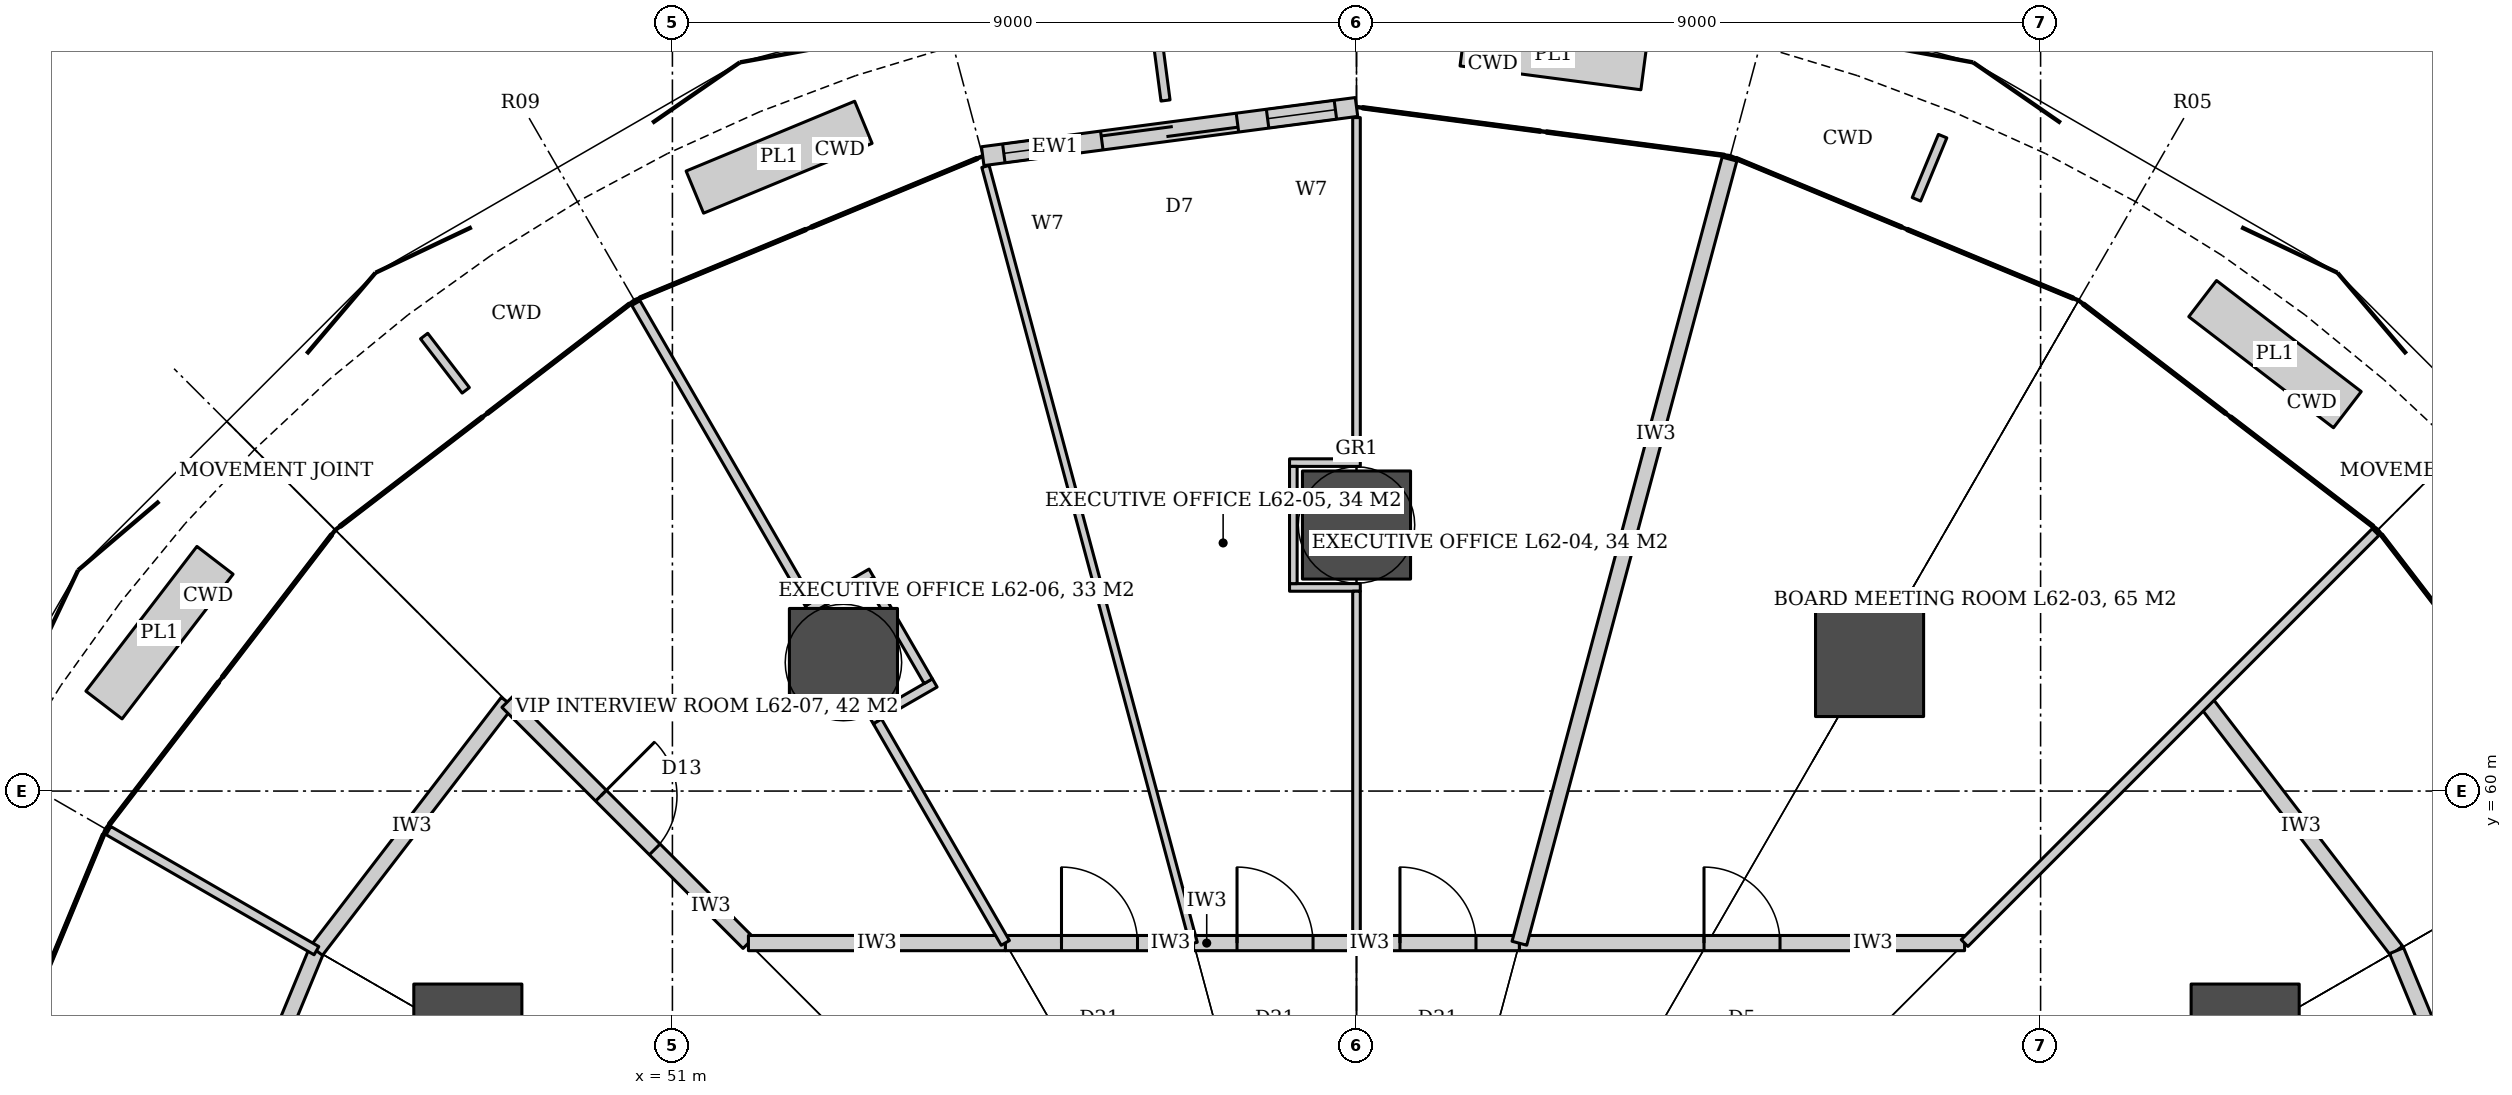
"""IFC4 building model, lengths in metres.
Left out: names, types, materials, properties, quantities, classifications, styles, units other than length and angle.
Written with IfcOpenShell. Run it as: python <this file> out.ifc"""

import sys

from ifc_helpers import new_model, si_unit, direction, frame, frame_2d, origin, origin_2d, place, context, subcontext, project, spatial, rectangle, hollow_circle, extrude, element, fill, save


model = new_model("IFC4")
c1 = context("Model", 3, precision=1e-05, world=origin(), true_north=direction((0.0, 1.0)))
c2 = subcontext(c1, "Body", "Model", "MODEL_VIEW")
j1 = project(units=[si_unit("LENGTHUNIT", "METRE"), si_unit("PLANEANGLEUNIT", "RADIAN")], contexts=[c1])
p1 = place(None, origin())
s1 = spatial("IfcSite", under=j1, at=p1, CompositionType="ELEMENT")
p2 = place(p1, origin())
s2 = spatial("IfcBuilding", under=s1, at=p2, CompositionType="ELEMENT")
p3 = place(p2, frame((0.0, 0.0, 269.6)))
s3 = spatial("IfcBuildingStorey", under=s2, at=p3, CompositionType="ELEMENT", Elevation=269.6)
for number, where, z_axis, x_axis in (
    (1, (71.691, 56.75, 0.0), (0.0, 0.0, 1.0), (1.0, 0.0, 0.0)),
    (2, (66.75, 61.691, 0.0), (0.0, 0.0, 1.0), (1.0, 0.0, 0.0)),
    (3, (60.0, 63.5, 0.0), (0.0, 0.0, 1.0), (1.0, 0.0, 0.0)),
    (4, (53.25, 61.691, 0.0), (0.0, 0.0, 1.0), (1.0, 0.0, 0.0)),
    (5, (48.309, 56.75, 0.0), (0.0, 0.0, 1.0), (1.0, 0.0, 0.0)),
):
    element("IfcColumn", number, at=place(p3, frame(where, z_axis=z_axis, x_axis=x_axis)), inside=s3, PredefinedType="COLUMN", context=c2, shape_type="SweptSolid", body=[
        extrude(hollow_circle(Radius=0.711, WallThickness=0.07, at=origin_2d()), origin(), (0.0, 0.0, 1.0), 4.2),
    ])
p4 = place(p3, frame((44.738, 54.089, 0.0), z_axis=(0.0, 0.0, 1.0), x_axis=(0.382731667114, 0.923859551549, 0.0)))
e6 = element("IfcWall", 6, at=p4, inside=s3, PredefinedType="PARTITIONING", context=c2, shape_type="SweptSolid", body=[
    extrude(rectangle(XDim=4.125, YDim=0.2, at=frame_2d((2.062, 0.0))), origin(), (0.0, 0.0, 1.0), 3.02),
])
p5 = place(p3, frame((46.317, 57.9, 0.0), z_axis=(0.0, 0.0, 1.0), x_axis=(0.608714823874, 0.793389099494, 0.0)))
e7 = element("IfcWall", 7, at=p5, inside=s3, PredefinedType="PARTITIONING", context=c2, shape_type="SweptSolid", body=[
    extrude(rectangle(XDim=4.125, YDim=0.2, at=frame_2d((2.062, 0.0))), origin(), (0.0, 0.0, 1.0), 3.02),
])
p6 = place(p3, frame((48.828, 61.172, 0.0), z_axis=(0.0, 0.0, 1.0), x_axis=(0.707106781187, -0.707106781187, 0.0)))
e8 = element("IfcWall", 8, at=p6, inside=s3, PredefinedType="PARTITIONING", context=c2, shape_type="SweptSolid", body=[
    extrude(rectangle(XDim=4.486, YDim=0.2, at=frame_2d((2.243, 0.0))), origin(), (0.0, 0.0, 1.0), 3.02),
])
p7 = place(p6, frame((1.743, 0.0, 0.0)))
e9 = element("IfcOpeningElement", 9, at=p7, cuts=e8, PredefinedType="OPENING", context=c2, shape_type="SweptSolid", body=[
    extrude(rectangle(XDim=1.0, YDim=2.4, at=frame_2d((0.5, 1.2))), frame((0.0, 0.11, 0.0), z_axis=(0.0, -1.0, 0.0), x_axis=(1.0, 0.0, 0.0)), (0.0, 0.0, 1.0), 0.22),
])
p8 = place(p3, frame((52.0, 58.0, 0.0), z_axis=(0.0, 0.0, 1.0), x_axis=(1.0, 0.0, 0.0)))
e10 = element("IfcWall", 10, at=p8, inside=s3, PredefinedType="PARTITIONING", context=c2, shape_type="SweptSolid", body=[
    extrude(rectangle(XDim=3.381, YDim=0.2, at=frame_2d((1.69, 0.0))), origin(), (0.0, 0.0, 1.0), 3.04),
])
p9 = place(p3, frame((55.381, 58.0, 0.0), z_axis=(0.0, 0.0, 1.0), x_axis=(1.0, 0.0, 0.0)))
e11 = element("IfcWall", 11, at=p9, inside=s3, PredefinedType="PARTITIONING", context=c2, shape_type="SweptSolid", body=[
    extrude(rectangle(XDim=2.475, YDim=0.2, at=frame_2d((1.238, 0.0))), origin(), (0.0, 0.0, 1.0), 3.04),
])
p10 = place(p9, frame((0.738, 0.0, 0.0)))
e12 = element("IfcOpeningElement", 12, at=p10, cuts=e11, PredefinedType="OPENING", context=c2, shape_type="SweptSolid", body=[
    extrude(rectangle(XDim=1.0, YDim=2.7, at=frame_2d((0.5, 1.35))), frame((0.0, 0.11, 0.0), z_axis=(0.0, -1.0, 0.0), x_axis=(1.0, 0.0, 0.0)), (0.0, 0.0, 1.0), 0.22),
])
p11 = place(p3, frame((57.856, 58.0, 0.0), z_axis=(0.0, 0.0, 1.0), x_axis=(1.0, 0.0, 0.0)))
e13 = element("IfcWall", 13, at=p11, inside=s3, PredefinedType="PARTITIONING", context=c2, shape_type="SweptSolid", body=[
    extrude(rectangle(XDim=2.144, YDim=0.2, at=frame_2d((1.072, 0.0))), origin(), (0.0, 0.0, 1.0), 3.04),
])
p12 = place(p11, frame((0.572, 0.0, 0.0)))
e14 = element("IfcOpeningElement", 14, at=p12, cuts=e13, PredefinedType="OPENING", context=c2, shape_type="SweptSolid", body=[
    extrude(rectangle(XDim=1.0, YDim=2.7, at=frame_2d((0.5, 1.35))), frame((0.0, 0.11, 0.0), z_axis=(0.0, -1.0, 0.0), x_axis=(1.0, 0.0, 0.0)), (0.0, 0.0, 1.0), 0.22),
])
p13 = place(p3, frame((60.0, 58.0, 0.0), z_axis=(0.0, 0.0, 1.0), x_axis=(1.0, 0.0, 0.0)))
e15 = element("IfcWall", 15, at=p13, inside=s3, PredefinedType="PARTITIONING", context=c2, shape_type="SweptSolid", body=[
    extrude(rectangle(XDim=2.144, YDim=0.2, at=frame_2d((1.072, 0.0))), origin(), (0.0, 0.0, 1.0), 3.04),
])
p14 = place(p13, frame((0.572, 0.0, 0.0)))
e16 = element("IfcOpeningElement", 16, at=p14, cuts=e15, PredefinedType="OPENING", context=c2, shape_type="SweptSolid", body=[
    extrude(rectangle(XDim=1.0, YDim=2.7, at=frame_2d((0.5, 1.35))), frame((0.0, 0.11, 0.0), z_axis=(0.0, -1.0, 0.0), x_axis=(1.0, 0.0, 0.0)), (0.0, 0.0, 1.0), 0.22),
])
p15 = place(p3, frame((62.144, 58.0, 0.0), z_axis=(0.0, 0.0, 1.0), x_axis=(1.0, 0.0, 0.0)))
e17 = element("IfcWall", 17, at=p15, inside=s3, PredefinedType="PARTITIONING", context=c2, shape_type="SweptSolid", body=[
    extrude(rectangle(XDim=5.856, YDim=0.2, at=frame_2d((2.928, 0.0))), origin(), (0.0, 0.0, 1.0), 3.04),
])
p16 = place(p15, frame((2.428, 0.0, 0.0)))
e18 = element("IfcOpeningElement", 18, at=p16, cuts=e17, PredefinedType="OPENING", context=c2, shape_type="SweptSolid", body=[
    extrude(rectangle(XDim=1.0, YDim=2.1, at=frame_2d((0.5, 1.05))), frame((0.0, 0.11, 0.0), z_axis=(0.0, -1.0, 0.0), x_axis=(1.0, 0.0, 0.0)), (0.0, 0.0, 1.0), 0.22),
])
p17 = place(p3, frame((71.172, 61.172, 0.0), z_axis=(0.0, 0.0, 1.0), x_axis=(0.608714823874, -0.793389099494, 0.0)))
e19 = element("IfcWall", 19, at=p17, inside=s3, PredefinedType="PARTITIONING", context=c2, shape_type="SweptSolid", body=[
    extrude(rectangle(XDim=4.125, YDim=0.2, at=frame_2d((2.062, 0.0))), origin(), (0.0, 0.0, 1.0), 3.02),
])
p18 = place(p3, frame((73.683, 57.9, 0.0), z_axis=(0.0, 0.0, 1.0), x_axis=(0.382731667114, -0.923859551549, 0.0)))
e20 = element("IfcWall", 20, at=p18, inside=s3, PredefinedType="PARTITIONING", context=c2, shape_type="SweptSolid", body=[
    extrude(rectangle(XDim=4.125, YDim=0.2, at=frame_2d((2.062, 0.0))), origin(), (0.0, 0.0, 1.0), 3.02),
])
p19 = place(p3, frame((68.0, 58.0, 0.0), z_axis=(0.0, 0.0, 1.0), x_axis=(0.707106781187, 0.707106781187, 0.0)))
e21 = element("IfcWall", 21, at=p19, inside=s3, PredefinedType="PARTITIONING", context=c2, shape_type="SweptSolid", body=[
    extrude(rectangle(XDim=7.646, YDim=0.125, at=frame_2d((3.823, 0.0))), origin(), (0.0, 0.0, 1.0), 3.02),
])
p20 = place(p3, frame((62.143, 57.998, 0.0), z_axis=(0.0, 0.0, 1.0), x_axis=(0.258814926071, 0.965926929971, 0.0)))
e22 = element("IfcWall", 22, at=p20, inside=s3, PredefinedType="PARTITIONING", context=c2, shape_type="SweptSolid", body=[
    extrude(rectangle(XDim=10.68, YDim=0.2, at=frame_2d((5.34, 0.0))), origin(), (0.0, 0.0, 1.0), 3.02),
])
for number, where, z_axis, x_axis in (
    (23, (60.05, 62.679, 0.0), (0.0, 0.0, 1.0), (-1.0, 0.0, 0.0)),
    (24, (60.05, 64.321, 0.0), (0.0, 0.0, 1.0), (-1.0, 0.0, 0.0)),
):
    element("IfcWall", number, at=place(p3, frame(where, z_axis=z_axis, x_axis=x_axis)), inside=s3, PredefinedType="PARTITIONING", context=c2, shape_type="SweptSolid", body=[
        extrude(rectangle(XDim=0.931, YDim=0.1, at=frame_2d((0.466, 0.0))), origin(), (0.0, 0.0, 1.0), 3.02),
    ])
p21 = place(p3, frame((59.169, 62.729, 0.0), z_axis=(0.0, 0.0, 1.0), x_axis=(0.0, 1.0, 0.0)))
e25 = element("IfcWall", 25, at=p21, inside=s3, PredefinedType="PARTITIONING", context=c2, shape_type="SweptSolid", body=[
    extrude(rectangle(XDim=1.542, YDim=0.1, at=frame_2d((0.771, 0.0))), origin(), (0.0, 0.0, 1.0), 3.02),
])
p22 = place(p3, frame((60.0, 58.0, 0.0), z_axis=(0.0, 0.0, 1.0), x_axis=(0.0, 1.0, 0.0)))
e26 = element("IfcWall", 26, at=p22, inside=s3, PredefinedType="PARTITIONING", context=c2, shape_type="SweptSolid", body=[
    extrude(rectangle(XDim=4.629, YDim=0.1, at=frame_2d((2.314, 0.0))), origin(), (0.0, 0.0, 1.0), 3.04),
])
p23 = place(p3, frame((60.0, 64.371, 0.0), z_axis=(0.0, 0.0, 1.0), x_axis=(0.0, 1.0, 0.0)))
e27 = element("IfcWall", 27, at=p23, inside=s3, PredefinedType="PARTITIONING", context=c2, shape_type="SweptSolid", body=[
    extrude(rectangle(XDim=4.489, YDim=0.1, at=frame_2d((2.245, 0.0))), origin(), (0.0, 0.0, 1.0), 3.02),
])
p24 = place(p3, frame((57.857, 57.998, 0.0), z_axis=(0.0, 0.0, 1.0), x_axis=(-0.258817209762, 0.965926318065, 0.0)))
e28 = element("IfcWall", 28, at=p24, inside=s3, PredefinedType="PARTITIONING", context=c2, shape_type="SweptSolid", body=[
    extrude(rectangle(XDim=10.58, YDim=0.1, at=frame_2d((5.29, 0.0))), origin(), (0.0, 0.0, 1.0), 3.02),
])
for number, where, z_axis, x_axis in (
    (29, (53.613, 60.938, 0.0), (0.0, 0.0, 1.0), (0.866, 0.5, 0.0)),
    (30, (52.779, 62.382, 0.0), (0.0, 0.0, 1.0), (0.866, 0.5, 0.0)),
):
    element("IfcWall", number, at=place(p3, frame(where, z_axis=z_axis, x_axis=x_axis)), inside=s3, PredefinedType="PARTITIONING", context=c2, shape_type="SweptSolid", body=[
        extrude(rectangle(XDim=0.969, YDim=0.125, at=frame_2d((0.484, 0.0))), origin(), (0.0, 0.0, 1.0), 3.02),
    ])
p25 = place(p3, frame((54.366, 61.445, 0.0), z_axis=(0.0, 0.0, 1.0), x_axis=(-0.499987416453, 0.866032668777, 0.0)))
e31 = element("IfcWall", 31, at=p25, inside=s3, PredefinedType="PARTITIONING", context=c2, shape_type="SweptSolid", body=[
    extrude(rectangle(XDim=1.542, YDim=0.125, at=frame_2d((0.771, 0.0))), origin(), (0.0, 0.0, 1.0), 3.02),
])
p26 = place(p3, frame((55.38, 58.002, 0.0), z_axis=(0.0, 0.0, 1.0), x_axis=(-0.500003080363, 0.866023625329, 0.0)))
e32 = element("IfcWall", 32, at=p26, inside=s3, PredefinedType="PARTITIONING", context=c2, shape_type="SweptSolid", body=[
    extrude(rectangle(XDim=3.364, YDim=0.125, at=frame_2d((1.682, 0.0))), origin(), (0.0, 0.0, 1.0), 3.04),
])
p27 = place(p3, frame((52.802, 62.467, 0.0), z_axis=(0.0, 0.0, 1.0), x_axis=(-0.499987929865, 0.866032372368, 0.0)))
e33 = element("IfcWall", 33, at=p27, inside=s3, PredefinedType="PARTITIONING", context=c2, shape_type="SweptSolid", body=[
    extrude(rectangle(XDim=4.564, YDim=0.125, at=frame_2d((2.282, 0.0))), origin(), (0.0, 0.0, 1.0), 3.02),
])
p28 = place(p3, frame((46.317, 57.9, 0.0), z_axis=(0.0, 0.0, 1.0), x_axis=(-0.866028632512, 0.499994407638, 0.0)))
e34 = element("IfcWall", 34, at=p28, inside=s3, PredefinedType="PARTITIONING", context=c2, shape_type="SweptSolid", body=[
    extrude(rectangle(XDim=3.16, YDim=0.125, at=frame_2d((1.58, 0.0))), origin(), (0.0, 0.0, 1.0), 3.02),
])
p29 = place(p3, frame((60.0, 69.0, 0.0), z_axis=(0.0, 0.0, 1.0), x_axis=(-0.991443234469, -0.130538549191, 0.0)))
e35 = element("IfcWall", 35, at=p29, inside=s3, PredefinedType="SOLIDWALL", context=c2, shape_type="SweptSolid", body=[
    extrude(rectangle(XDim=4.96, YDim=0.25, at=frame_2d((2.48, 0.0))), origin(), (0.0, 0.0, 1.0), 4.04),
])
p30 = place(p29, frame((1.58, 0.0, 0.0)))
e36 = element("IfcOpeningElement", 36, at=p30, cuts=e35, PredefinedType="OPENING", context=c2, shape_type="SweptSolid", body=[
    extrude(rectangle(XDim=1.8, YDim=2.4, at=frame_2d((0.9, 1.2))), frame((0.0, 0.135, 0.0), z_axis=(0.0, -1.0, 0.0), x_axis=(1.0, 0.0, 0.0)), (0.0, 0.0, 1.0), 0.27),
])
p31 = place(p29, frame((0.28, 0.0, 0.0)))
e37 = element("IfcOpeningElement", 37, at=p31, cuts=e35, PredefinedType="OPENING", context=c2, shape_type="SweptSolid", body=[
    extrude(rectangle(XDim=0.9, YDim=2.4, at=frame_2d((0.45, 1.2))), frame((0.0, 0.135, 0.0), z_axis=(0.0, -1.0, 0.0), x_axis=(1.0, 0.0, 0.0)), (0.0, 0.0, 1.0), 0.27),
])
p32 = place(p29, frame((3.78, 0.0, 0.0)))
e38 = element("IfcOpeningElement", 38, at=p32, cuts=e35, PredefinedType="OPENING", context=c2, shape_type="SweptSolid", body=[
    extrude(rectangle(XDim=0.9, YDim=2.4, at=frame_2d((0.45, 1.2))), frame((0.0, 0.135, 0.0), z_axis=(0.0, -1.0, 0.0), x_axis=(1.0, 0.0, 0.0)), (0.0, 0.0, 1.0), 0.27),
])
p33 = place(p16, origin())
e39 = element("IfcDoor", 39, at=p33, inside=s3, OperationType="SINGLE_SWING_LEFT", PredefinedType="DOOR", context=c2, shape_type="SweptSolid", body=[
    extrude(rectangle(XDim=1.0, YDim=2.1, at=frame_2d((0.5, 1.05))), frame((0.0, 0.025, 0.0), z_axis=(0.0, -1.0, 0.0), x_axis=(1.0, 0.0, 0.0)), (0.0, 0.0, 1.0), 0.05),
])
fill(e18, e39)
p34 = place(p14, origin())
e40 = element("IfcDoor", 40, at=p34, inside=s3, OperationType="SINGLE_SWING_LEFT", PredefinedType="DOOR", context=c2, shape_type="SweptSolid", body=[
    extrude(rectangle(XDim=1.0, YDim=2.7, at=frame_2d((0.5, 1.35))), frame((0.0, 0.025, 0.0), z_axis=(0.0, -1.0, 0.0), x_axis=(1.0, 0.0, 0.0)), (0.0, 0.0, 1.0), 0.05),
])
fill(e16, e40)
p35 = place(p12, origin())
e41 = element("IfcDoor", 41, at=p35, inside=s3, OperationType="SINGLE_SWING_LEFT", PredefinedType="DOOR", context=c2, shape_type="SweptSolid", body=[
    extrude(rectangle(XDim=1.0, YDim=2.7, at=frame_2d((0.5, 1.35))), frame((0.0, 0.025, 0.0), z_axis=(0.0, -1.0, 0.0), x_axis=(1.0, 0.0, 0.0)), (0.0, 0.0, 1.0), 0.05),
])
fill(e14, e41)
p36 = place(p10, origin())
e42 = element("IfcDoor", 42, at=p36, inside=s3, OperationType="SINGLE_SWING_LEFT", PredefinedType="DOOR", context=c2, shape_type="SweptSolid", body=[
    extrude(rectangle(XDim=1.0, YDim=2.7, at=frame_2d((0.5, 1.35))), frame((0.0, 0.025, 0.0), z_axis=(0.0, -1.0, 0.0), x_axis=(1.0, 0.0, 0.0)), (0.0, 0.0, 1.0), 0.05),
])
fill(e12, e42)
p37 = place(p7, origin())
e43 = element("IfcDoor", 43, at=p37, inside=s3, OperationType="SINGLE_SWING_LEFT", PredefinedType="DOOR", context=c2, shape_type="SweptSolid", body=[
    extrude(rectangle(XDim=1.0, YDim=2.4, at=frame_2d((0.5, 1.2))), frame((0.0, 0.025, 0.0), z_axis=(0.0, -1.0, 0.0), x_axis=(1.0, 0.0, 0.0)), (0.0, 0.0, 1.0), 0.05),
])
fill(e9, e43)
p38 = place(p30, origin())
e44 = element("IfcDoor", 44, at=p38, inside=s3, OperationType="DOUBLE_DOOR_SLIDING", PredefinedType="DOOR", context=c2, shape_type="SweptSolid", body=[
    extrude(rectangle(XDim=1.8, YDim=2.4, at=frame_2d((0.9, 1.2))), frame((0.0, 0.025, 0.0), z_axis=(0.0, -1.0, 0.0), x_axis=(1.0, 0.0, 0.0)), (0.0, 0.0, 1.0), 0.05),
])
fill(e36, e44)
p39 = place(p31, origin())
e45 = element("IfcWindow", 45, at=p39, inside=s3, PartitioningType="SINGLE_PANEL", PredefinedType="WINDOW", context=c2, shape_type="SweptSolid", body=[
    extrude(rectangle(XDim=0.9, YDim=2.4, at=frame_2d((0.45, 1.2))), frame((0.0, 0.03, 0.0), z_axis=(0.0, -1.0, 0.0), x_axis=(1.0, 0.0, 0.0)), (0.0, 0.0, 1.0), 0.06),
])
fill(e37, e45)
p40 = place(p32, origin())
e46 = element("IfcWindow", 46, at=p40, inside=s3, PartitioningType="SINGLE_PANEL", PredefinedType="WINDOW", context=c2, shape_type="SweptSolid", body=[
    extrude(rectangle(XDim=0.9, YDim=2.4, at=frame_2d((0.45, 1.2))), frame((0.0, 0.03, 0.0), z_axis=(0.0, -1.0, 0.0), x_axis=(1.0, 0.0, 0.0)), (0.0, 0.0, 1.0), 0.06),
])
fill(e38, e46)
save(model, sys.argv[1])
